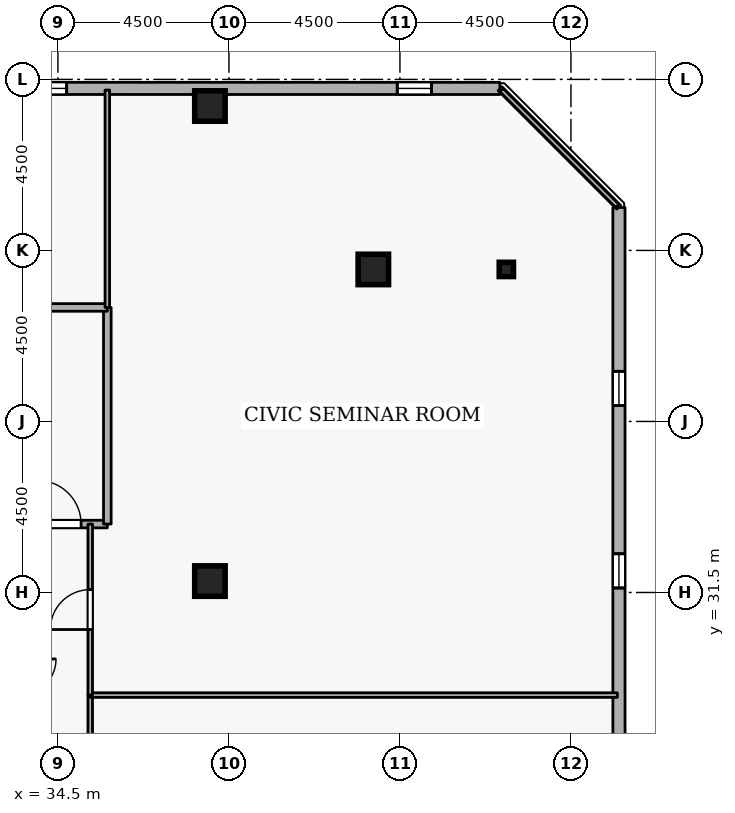
"""IFC4 building model, lengths in metres.
Left out: names, types, materials, properties, quantities, classifications, styles, units other than length and angle.
Written with IfcOpenShell. Run it as: python <this file> out.ifc"""

import sys

from ifc_helpers import new_model, si_unit, direction, frame, frame_2d, origin, origin_2d, place, context, subcontext, project, spatial, rectangle, i_section, extrude, element, fill, save


model = new_model("IFC4")
c1 = context("Model", 3, precision=1e-05, world=origin(), true_north=direction((0.0, 1.0)))
c2 = subcontext(c1, "Body", "Model", "MODEL_VIEW")
j1 = project(units=[si_unit("LENGTHUNIT", "METRE"), si_unit("PLANEANGLEUNIT", "RADIAN")], contexts=[c1])
p1 = place(None, origin())
s1 = spatial("IfcSite", under=j1, at=p1, CompositionType="ELEMENT")
p2 = place(p1, origin())
s2 = spatial("IfcBuilding", under=s1, at=p2, CompositionType="ELEMENT")
p3 = place(p2, frame((0.0, 0.0, 269.1)))
s3 = spatial("IfcBuildingStorey", under=s2, at=p3, CompositionType="ELEMENT", Elevation=269.1)
for number, where, z_axis, x_axis in (
    (1, (42.8, 40.0, 0.0), (0.0, 0.0, 1.0), (1.0, 0.0, 0.0)),
    (2, (38.5, 44.3, 0.0), (0.0, 0.0, 1.0), (1.0, 0.0, 0.0)),
    (3, (38.5, 31.8, 0.0), (0.0, 0.0, 1.0), (1.0, 0.0, 0.0)),
):
    element("IfcColumn", number, at=place(p3, frame(where, z_axis=z_axis, x_axis=x_axis)), inside=s3, PredefinedType="COLUMN", context=c2, shape_type="SweptSolid", body=[
        extrude(rectangle(XDim=0.8, YDim=0.8, at=origin_2d()), origin(), (0.0, 0.0, 1.0), 3.6),
    ])
p4 = place(p3, frame((46.3, 40.0, 0.0), z_axis=(0.0, 0.0, 1.0), x_axis=(1.0, 0.0, 0.0)))
e4 = element("IfcColumn", 4, at=p4, inside=s3, PredefinedType="COLUMN", context=c2, shape_type="SweptSolid", body=[
    extrude(i_section(OverallWidth=0.375, OverallDepth=0.375, WebThickness=0.017, FlangeThickness=0.027, FilletRadius=0.015, at=origin_2d()), origin(), (0.0, 0.0, 1.0), 3.6),
])
p5 = place(p3, frame((49.265, 5.819, 0.0), z_axis=(0.0, 0.0, 1.0), x_axis=(-5.4540124e-05, 0.999999998513, 0.0)))
e5 = element("IfcWall", 5, at=p5, inside=s3, PredefinedType="STANDARD", context=c2, shape_type="SweptSolid", body=[
    extrude(rectangle(XDim=35.811, YDim=0.32, at=frame_2d((17.905, 0.0))), origin(), (0.0, 0.0, 1.0), 2.7),
])
p6 = place(p5, frame((1.8, 0.0, 0.72)))
e6 = element("IfcOpeningElement", 6, at=p6, cuts=e5, PredefinedType="OPENING", context=c2, shape_type="SweptSolid", body=[
    extrude(rectangle(XDim=0.9, YDim=1.75, at=frame_2d((0.45, 0.875))), frame((0.0, 0.17, 0.0), z_axis=(0.0, -1.0, 0.0), x_axis=(1.0, 0.0, 0.0)), (0.0, 0.0, 1.0), 0.34),
])
p7 = place(p5, frame((6.6, 0.0, 0.72)))
e7 = element("IfcOpeningElement", 7, at=p7, cuts=e5, PredefinedType="OPENING", context=c2, shape_type="SweptSolid", body=[
    extrude(rectangle(XDim=0.9, YDim=1.75, at=frame_2d((0.45, 0.875))), frame((0.0, 0.17, 0.0), z_axis=(0.0, -1.0, 0.0), x_axis=(1.0, 0.0, 0.0)), (0.0, 0.0, 1.0), 0.34),
])
p8 = place(p5, frame((11.4, 0.0, 0.72)))
e8 = element("IfcOpeningElement", 8, at=p8, cuts=e5, PredefinedType="OPENING", context=c2, shape_type="SweptSolid", body=[
    extrude(rectangle(XDim=0.9, YDim=1.75, at=frame_2d((0.45, 0.875))), frame((0.0, 0.17, 0.0), z_axis=(0.0, -1.0, 0.0), x_axis=(1.0, 0.0, 0.0)), (0.0, 0.0, 1.0), 0.34),
])
p9 = place(p5, frame((21.0, 0.0, 0.72)))
e9 = element("IfcOpeningElement", 9, at=p9, cuts=e5, PredefinedType="OPENING", context=c2, shape_type="SweptSolid", body=[
    extrude(rectangle(XDim=0.9, YDim=1.75, at=frame_2d((0.45, 0.875))), frame((0.0, 0.17, 0.0), z_axis=(0.0, -1.0, 0.0), x_axis=(1.0, 0.0, 0.0)), (0.0, 0.0, 1.0), 0.34),
])
p10 = place(p5, frame((25.8, 0.0, 0.72)))
e10 = element("IfcOpeningElement", 10, at=p10, cuts=e5, PredefinedType="OPENING", context=c2, shape_type="SweptSolid", body=[
    extrude(rectangle(XDim=0.9, YDim=1.75, at=frame_2d((0.45, 0.875))), frame((0.0, 0.17, 0.0), z_axis=(0.0, -1.0, 0.0), x_axis=(1.0, 0.0, 0.0)), (0.0, 0.0, 1.0), 0.34),
])
p11 = place(p5, frame((30.6, 0.0, 0.72)))
e11 = element("IfcOpeningElement", 11, at=p11, cuts=e5, PredefinedType="OPENING", context=c2, shape_type="SweptSolid", body=[
    extrude(rectangle(XDim=0.9, YDim=1.75, at=frame_2d((0.45, 0.875))), frame((0.0, 0.17, 0.0), z_axis=(0.0, -1.0, 0.0), x_axis=(1.0, 0.0, 0.0)), (0.0, 0.0, 1.0), 0.34),
])
p12 = place(p3, frame((46.129, 44.763, 0.0), z_axis=(0.0, 0.0, 1.0), x_axis=(-0.999999998513, 5.4540124e-05, 0.0)))
e12 = element("IfcWall", 12, at=p12, inside=s3, PredefinedType="STANDARD", context=c2, shape_type="SweptSolid", body=[
    extrude(rectangle(XDim=35.811, YDim=0.32, at=frame_2d((17.905, 0.0))), origin(), (0.0, 0.0, 1.0), 2.7),
])
p13 = place(p12, frame((1.8, 0.0, 0.72)))
e13 = element("IfcOpeningElement", 13, at=p13, cuts=e12, PredefinedType="OPENING", context=c2, shape_type="SweptSolid", body=[
    extrude(rectangle(XDim=0.9, YDim=1.75, at=frame_2d((0.45, 0.875))), frame((0.0, 0.17, 0.0), z_axis=(0.0, -1.0, 0.0), x_axis=(1.0, 0.0, 0.0)), (0.0, 0.0, 1.0), 0.34),
])
p14 = place(p12, frame((11.4, 0.0, 0.72)))
e14 = element("IfcOpeningElement", 14, at=p14, cuts=e12, PredefinedType="OPENING", context=c2, shape_type="SweptSolid", body=[
    extrude(rectangle(XDim=0.9, YDim=1.75, at=frame_2d((0.45, 0.875))), frame((0.0, 0.17, 0.0), z_axis=(0.0, -1.0, 0.0), x_axis=(1.0, 0.0, 0.0)), (0.0, 0.0, 1.0), 0.34),
])
p15 = place(p12, frame((16.2, 0.0, 0.72)))
e15 = element("IfcOpeningElement", 15, at=p15, cuts=e12, PredefinedType="OPENING", context=c2, shape_type="SweptSolid", body=[
    extrude(rectangle(XDim=0.9, YDim=1.75, at=frame_2d((0.45, 0.875))), frame((0.0, 0.17, 0.0), z_axis=(0.0, -1.0, 0.0), x_axis=(1.0, 0.0, 0.0)), (0.0, 0.0, 1.0), 0.34),
])
p16 = place(p12, frame((25.8, 0.0, 0.72)))
e16 = element("IfcOpeningElement", 16, at=p16, cuts=e12, PredefinedType="OPENING", context=c2, shape_type="SweptSolid", body=[
    extrude(rectangle(XDim=0.9, YDim=1.75, at=frame_2d((0.45, 0.875))), frame((0.0, 0.17, 0.0), z_axis=(0.0, -1.0, 0.0), x_axis=(1.0, 0.0, 0.0)), (0.0, 0.0, 1.0), 0.34),
])
p17 = place(p3, frame((33.3, 33.3, 0.0), z_axis=(0.0, 0.0, 1.0), x_axis=(1.0, 0.0, 0.0)))
e17 = element("IfcWall", 17, at=p17, inside=s3, PredefinedType="STANDARD", context=c2, shape_type="SweptSolid", body=[
    extrude(rectangle(XDim=2.5, YDim=0.2, at=frame_2d((1.25, 0.0))), origin(), (0.0, 0.0, 1.0), 3.34),
])
p18 = place(p17, frame((0.66, 0.0, 0.0)))
e18 = element("IfcOpeningElement", 18, at=p18, cuts=e17, PredefinedType="OPENING", context=c2, shape_type="SweptSolid", body=[
    extrude(rectangle(XDim=1.15, YDim=2.1, at=frame_2d((0.575, 1.05))), frame((0.0, 0.11, 0.0), z_axis=(0.0, -1.0, 0.0), x_axis=(1.0, 0.0, 0.0)), (0.0, 0.0, 1.0), 0.22),
])
p19 = place(p3, frame((35.8, 33.3, 0.0), z_axis=(0.0, 0.0, 1.0), x_axis=(0.0, 1.0, 0.0)))
e19 = element("IfcWall", 19, at=p19, inside=s3, PredefinedType="STANDARD", context=c2, shape_type="SweptSolid", body=[
    extrude(rectangle(XDim=5.7, YDim=0.2, at=frame_2d((2.85, 0.0))), origin(), (0.0, 0.0, 1.0), 3.34),
])
p20 = place(p3, frame((35.8, 39.0, 0.0), z_axis=(0.0, 0.0, 1.0), x_axis=(-1.0, 0.0, 0.0)))
e20 = element("IfcWall", 20, at=p20, inside=s3, PredefinedType="STANDARD", context=c2, shape_type="SweptSolid", body=[
    extrude(rectangle(XDim=2.5, YDim=0.2, at=frame_2d((1.25, 0.0))), origin(), (0.0, 0.0, 1.0), 3.34),
])
p21 = place(p3, frame((35.35, 22.5, 0.0), z_axis=(0.0, 0.0, 1.0), x_axis=(0.0, 1.0, 0.0)))
e21 = element("IfcWall", 21, at=p21, inside=s3, PredefinedType="PARTITIONING", context=c2, shape_type="SweptSolid", body=[
    extrude(rectangle(XDim=6.3, YDim=0.12, at=frame_2d((3.15, 0.0))), origin(), (0.0, 0.0, 1.0), 3.34),
])
p22 = place(p21, frame((2.625, 0.0, 0.0)))
e22 = element("IfcOpeningElement", 22, at=p22, cuts=e21, PredefinedType="OPENING", context=c2, shape_type="SweptSolid", body=[
    extrude(rectangle(XDim=1.05, YDim=2.1, at=frame_2d((0.525, 1.05))), frame((0.0, 0.07, 0.0), z_axis=(0.0, -1.0, 0.0), x_axis=(1.0, 0.0, 0.0)), (0.0, 0.0, 1.0), 0.14),
])
p23 = place(p3, frame((35.35, 28.8, 0.0), z_axis=(0.0, 0.0, 1.0), x_axis=(1.0, 0.0, 0.0)))
e23 = element("IfcWall", 23, at=p23, inside=s3, PredefinedType="PARTITIONING", context=c2, shape_type="SweptSolid", body=[
    extrude(rectangle(XDim=13.87, YDim=0.12, at=frame_2d((6.935, 0.0))), origin(), (0.0, 0.0, 1.0), 3.34),
])
p24 = place(p3, frame((35.8, 39.0, 0.0), z_axis=(0.0, 0.0, 1.0), x_axis=(0.0, 1.0, 0.0)))
e24 = element("IfcWall", 24, at=p24, inside=s3, PredefinedType="PARTITIONING", context=c2, shape_type="SweptSolid", body=[
    extrude(rectangle(XDim=5.72, YDim=0.12, at=frame_2d((2.86, 0.0))), origin(), (0.0, 0.0, 1.0), 3.34),
])
p25 = place(p3, frame((46.171, 44.72, 0.0), z_axis=(0.0, 0.0, 1.0), x_axis=(0.707106781187, -0.707106781187, 0.0)))
e25 = element("IfcWall", 25, at=p25, inside=s3, PredefinedType="PARTITIONING", context=c2, shape_type="SweptSolid", body=[
    extrude(rectangle(XDim=4.311, YDim=0.12, at=frame_2d((2.156, 0.0))), origin(), (0.0, 0.0, 1.0), 3.34),
])
p26 = place(p3, frame((35.35, 28.8, 0.0), z_axis=(0.0, 0.0, 1.0), x_axis=(0.0, 1.0, 0.0)))
e26 = element("IfcWall", 26, at=p26, inside=s3, PredefinedType="PARTITIONING", context=c2, shape_type="SweptSolid", body=[
    extrude(rectangle(XDim=4.5, YDim=0.12, at=frame_2d((2.25, 0.0))), origin(), (0.0, 0.0, 1.0), 3.34),
])
p27 = place(p26, frame((1.725, 0.0, 0.0)))
e27 = element("IfcOpeningElement", 27, at=p27, cuts=e26, PredefinedType="OPENING", context=c2, shape_type="SweptSolid", body=[
    extrude(rectangle(XDim=1.05, YDim=2.1, at=frame_2d((0.525, 1.05))), frame((0.0, 0.07, 0.0), z_axis=(0.0, -1.0, 0.0), x_axis=(1.0, 0.0, 0.0)), (0.0, 0.0, 1.0), 0.14),
])
p28 = place(p10, origin())
e28 = element("IfcWindow", 28, at=p28, inside=s3, PartitioningType="SINGLE_PANEL", PredefinedType="WINDOW", context=c2, shape_type="SweptSolid", body=[
    extrude(rectangle(XDim=0.9, YDim=1.75, at=frame_2d((0.45, 0.875))), frame((0.0, 0.03, 0.0), z_axis=(0.0, -1.0, 0.0), x_axis=(1.0, 0.0, 0.0)), (0.0, 0.0, 1.0), 0.06),
])
fill(e10, e28)
p29 = place(p11, origin())
e29 = element("IfcWindow", 29, at=p29, inside=s3, PartitioningType="SINGLE_PANEL", PredefinedType="WINDOW", context=c2, shape_type="SweptSolid", body=[
    extrude(rectangle(XDim=0.9, YDim=1.75, at=frame_2d((0.45, 0.875))), frame((0.0, 0.03, 0.0), z_axis=(0.0, -1.0, 0.0), x_axis=(1.0, 0.0, 0.0)), (0.0, 0.0, 1.0), 0.06),
])
fill(e11, e29)
p30 = place(p13, origin())
e30 = element("IfcWindow", 30, at=p30, inside=s3, PartitioningType="SINGLE_PANEL", PredefinedType="WINDOW", context=c2, shape_type="SweptSolid", body=[
    extrude(rectangle(XDim=0.9, YDim=1.75, at=frame_2d((0.45, 0.875))), frame((0.0, 0.03, 0.0), z_axis=(0.0, -1.0, 0.0), x_axis=(1.0, 0.0, 0.0)), (0.0, 0.0, 1.0), 0.06),
])
fill(e13, e30)
p31 = place(p14, origin())
e31 = element("IfcWindow", 31, at=p31, inside=s3, PartitioningType="SINGLE_PANEL", PredefinedType="WINDOW", context=c2, shape_type="SweptSolid", body=[
    extrude(rectangle(XDim=0.9, YDim=1.75, at=frame_2d((0.45, 0.875))), frame((0.0, 0.03, 0.0), z_axis=(0.0, -1.0, 0.0), x_axis=(1.0, 0.0, 0.0)), (0.0, 0.0, 1.0), 0.06),
])
fill(e14, e31)
p32 = place(p18, origin())
e32 = element("IfcDoor", 32, at=p32, inside=s3, OperationType="SINGLE_SWING_LEFT", PredefinedType="DOOR", context=c2, shape_type="SweptSolid", body=[
    extrude(rectangle(XDim=1.15, YDim=2.1, at=frame_2d((0.575, 1.05))), frame((0.0, 0.025, 0.0), z_axis=(0.0, -1.0, 0.0), x_axis=(1.0, 0.0, 0.0)), (0.0, 0.0, 1.0), 0.05),
])
fill(e18, e32)
p33 = place(p27, origin())
e33 = element("IfcDoor", 33, at=p33, inside=s3, OperationType="SINGLE_SWING_LEFT", PredefinedType="DOOR", context=c2, shape_type="SweptSolid", body=[
    extrude(rectangle(XDim=1.05, YDim=2.1, at=frame_2d((0.525, 1.05))), frame((0.0, 0.025, 0.0), z_axis=(0.0, -1.0, 0.0), x_axis=(1.0, 0.0, 0.0)), (0.0, 0.0, 1.0), 0.05),
])
fill(e27, e33)
save(model, sys.argv[1])
